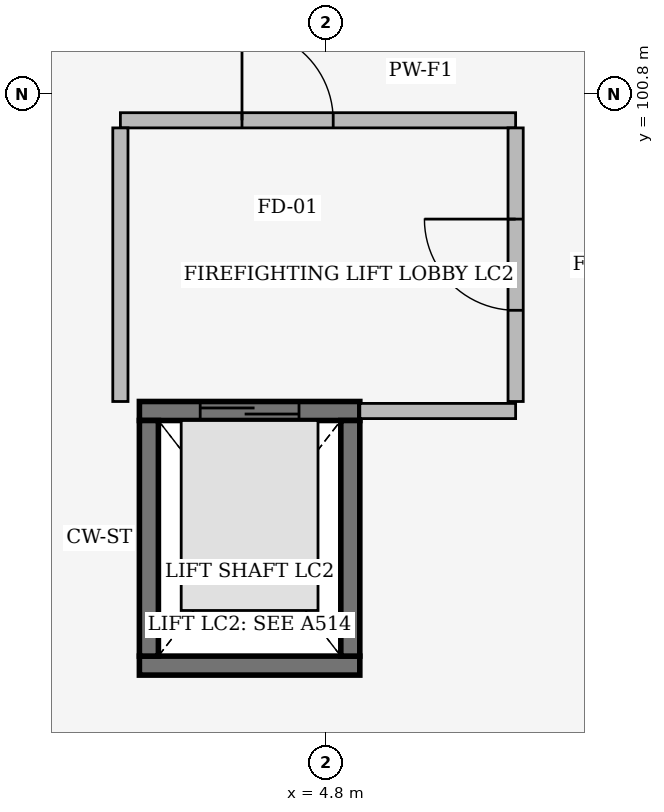
"""IFC4 building model, lengths in metres.
Left out: names, types, materials, properties, quantities, classifications, styles, units other than length and angle.
Written with IfcOpenShell. Run it as: python <this file> out.ifc"""

import sys

from ifc_helpers import new_model, si_unit, direction, frame, frame_2d, origin, place, context, subcontext, project, spatial, rectangle, extrude, element, fill, save


model = new_model("IFC4")
c1 = context("Model", 3, precision=1e-05, world=origin(), true_north=direction((0.0, 1.0)))
c2 = subcontext(c1, "Body", "Model", "MODEL_VIEW")
j1 = project(units=[si_unit("LENGTHUNIT", "METRE"), si_unit("PLANEANGLEUNIT", "RADIAN")], contexts=[c1])
p1 = place(None, origin())
s1 = spatial("IfcSite", under=j1, at=p1, CompositionType="ELEMENT")
p2 = place(p1, origin())
s2 = spatial("IfcBuilding", under=s1, at=p2, CompositionType="ELEMENT")
p3 = place(p2, frame((0.0, 0.0, 19.8)))
s3 = spatial("IfcBuildingStorey", under=s2, at=p3, CompositionType="ELEMENT", Elevation=19.8)
p4 = place(p3, frame((2.35, 93.275, 0.0), z_axis=(0.0, 0.0, 1.0), x_axis=(1.0, 0.0, 0.0)))
e1 = element("IfcWall", 1, at=p4, inside=s3, PredefinedType="SHEAR", context=c2, shape_type="SweptSolid", body=[
    extrude(rectangle(XDim=2.9, YDim=0.25, at=frame_2d((1.45, 0.0))), origin(), (0.0, 0.0, 1.0), 3.32),
])
p5 = place(p3, frame((2.35, 96.625, 0.0), z_axis=(0.0, 0.0, 1.0), x_axis=(1.0, 0.0, 0.0)))
e2 = element("IfcWall", 2, at=p5, inside=s3, PredefinedType="SHEAR", context=c2, shape_type="SweptSolid", body=[
    extrude(rectangle(XDim=2.9, YDim=0.25, at=frame_2d((1.45, 0.0))), origin(), (0.0, 0.0, 1.0), 3.32),
])
p6 = place(p5, frame((0.8, 0.0, 0.0)))
e3 = element("IfcOpeningElement", 3, at=p6, cuts=e2, PredefinedType="OPENING", context=c2, shape_type="SweptSolid", body=[
    extrude(rectangle(XDim=1.3, YDim=2.2, at=frame_2d((0.65, 1.1))), frame((0.0, 0.135, 0.0), z_axis=(0.0, -1.0, 0.0), x_axis=(1.0, 0.0, 0.0)), (0.0, 0.0, 1.0), 0.27),
])
for number, where, z_axis, x_axis in (
    (4, (2.475, 93.4, 0.0), (0.0, 0.0, 1.0), (0.0, 1.0, 0.0)),
    (5, (5.125, 93.4, 0.0), (0.0, 0.0, 1.0), (0.0, 1.0, 0.0)),
):
    element("IfcWall", number, at=place(p3, frame(where, z_axis=z_axis, x_axis=x_axis)), inside=s3, PredefinedType="SHEAR", context=c2, shape_type="SweptSolid", body=[
        extrude(rectangle(XDim=3.1, YDim=0.25, at=frame_2d((1.55, 0.0))), origin(), (0.0, 0.0, 1.0), 3.32),
    ])
p7 = place(p3, frame((2.1, 100.45, 0.0), z_axis=(0.0, 0.0, 1.0), x_axis=(1.0, 0.0, 0.0)))
e6 = element("IfcWall", 6, at=p7, inside=s3, PredefinedType="PARTITIONING", context=c2, shape_type="SweptSolid", body=[
    extrude(rectangle(XDim=5.2, YDim=0.2, at=frame_2d((2.6, 0.0))), origin(), (0.0, 0.0, 1.0), 2.976),
])
p8 = place(p7, frame((1.6, 0.0, 0.0)))
e7 = element("IfcOpeningElement", 7, at=p8, cuts=e6, PredefinedType="OPENING", context=c2, shape_type="SweptSolid", body=[
    extrude(rectangle(XDim=1.2, YDim=2.2, at=frame_2d((0.6, 1.1))), frame((0.0, 0.11, 0.0), z_axis=(0.0, -1.0, 0.0), x_axis=(1.0, 0.0, 0.0)), (0.0, 0.0, 1.0), 0.22),
])
p9 = place(p3, frame((2.1, 96.75, 0.0), z_axis=(0.0, 0.0, 1.0), x_axis=(0.0, 1.0, 0.0)))
e8 = element("IfcWall", 8, at=p9, inside=s3, PredefinedType="PARTITIONING", context=c2, shape_type="SweptSolid", body=[
    extrude(rectangle(XDim=3.6, YDim=0.2, at=frame_2d((1.8, 0.0))), origin(), (0.0, 0.0, 1.0), 2.933),
])
p10 = place(p3, frame((7.3, 96.75, 0.0), z_axis=(0.0, 0.0, 1.0), x_axis=(0.0, 1.0, 0.0)))
e9 = element("IfcWall", 9, at=p10, inside=s3, PredefinedType="PARTITIONING", context=c2, shape_type="SweptSolid", body=[
    extrude(rectangle(XDim=3.6, YDim=0.2, at=frame_2d((1.8, 0.0))), origin(), (0.0, 0.0, 1.0), 2.933),
])
p11 = place(p10, frame((1.2, 0.0, 0.0)))
e10 = element("IfcOpeningElement", 10, at=p11, cuts=e9, PredefinedType="OPENING", context=c2, shape_type="SweptSolid", body=[
    extrude(rectangle(XDim=1.2, YDim=2.2, at=frame_2d((0.6, 1.1))), frame((0.0, 0.11, 0.0), z_axis=(0.0, -1.0, 0.0), x_axis=(1.0, 0.0, 0.0)), (0.0, 0.0, 1.0), 0.22),
])
p12 = place(p3, frame((5.25, 96.625, 0.0), z_axis=(0.0, 0.0, 1.0), x_axis=(1.0, 0.0, 0.0)))
e11 = element("IfcWall", 11, at=p12, inside=s3, PredefinedType="PARTITIONING", context=c2, shape_type="SweptSolid", body=[
    extrude(rectangle(XDim=2.05, YDim=0.2, at=frame_2d((1.025, 0.0))), origin(), (0.0, 0.0, 1.0), 3.24),
])
p13 = place(p6, origin())
e12 = element("IfcDoor", 12, at=p13, inside=s3, OperationType="DOUBLE_DOOR_SLIDING", PredefinedType="DOOR", context=c2, shape_type="SweptSolid", body=[
    extrude(rectangle(XDim=1.3, YDim=2.2, at=frame_2d((0.65, 1.1))), frame((0.0, 0.025, 0.0), z_axis=(0.0, -1.0, 0.0), x_axis=(1.0, 0.0, 0.0)), (0.0, 0.0, 1.0), 0.05),
])
fill(e3, e12)
p14 = place(p11, origin())
e13 = element("IfcDoor", 13, at=p14, inside=s3, OperationType="SINGLE_SWING_RIGHT", PredefinedType="DOOR", context=c2, shape_type="SweptSolid", body=[
    extrude(rectangle(XDim=1.2, YDim=2.2, at=frame_2d((0.6, 1.1))), frame((0.0, 0.025, 0.0), z_axis=(0.0, -1.0, 0.0), x_axis=(1.0, 0.0, 0.0)), (0.0, 0.0, 1.0), 0.05),
])
fill(e10, e13)
p15 = place(p8, origin())
e14 = element("IfcDoor", 14, at=p15, inside=s3, OperationType="SINGLE_SWING_LEFT", PredefinedType="DOOR", context=c2, shape_type="SweptSolid", body=[
    extrude(rectangle(XDim=1.2, YDim=2.2, at=frame_2d((0.6, 1.1))), frame((0.0, 0.025, 0.0), z_axis=(0.0, -1.0, 0.0), x_axis=(1.0, 0.0, 0.0)), (0.0, 0.0, 1.0), 0.05),
])
fill(e7, e14)
save(model, sys.argv[1])
